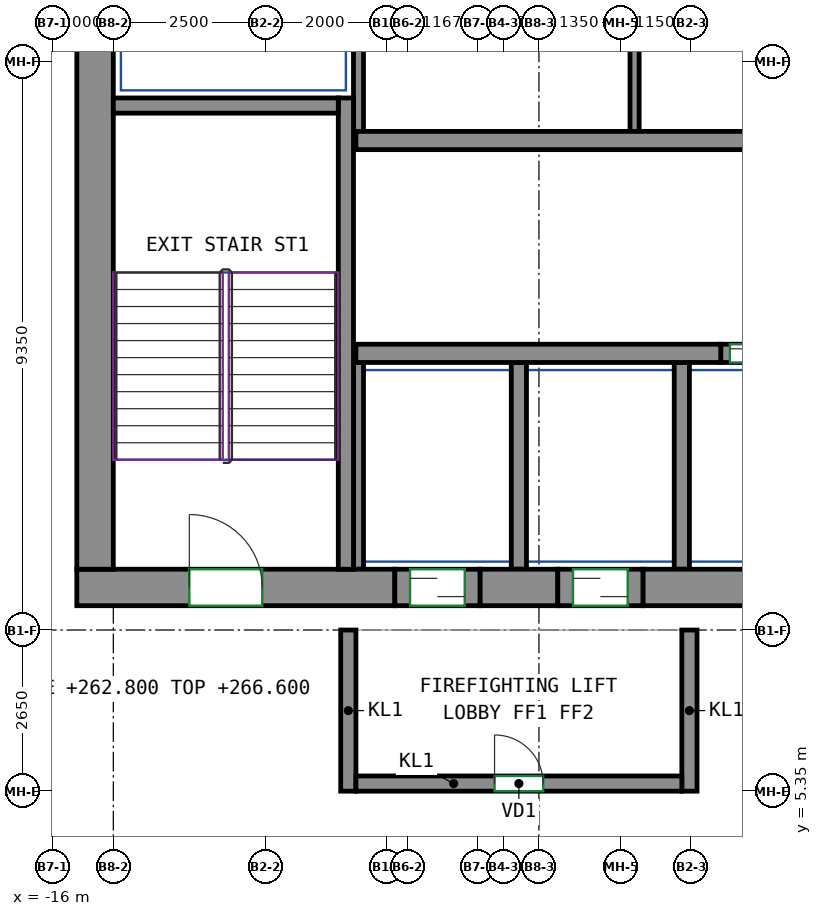
"""IFC4 building model, lengths in metres.
Left out: names, types, materials, properties, quantities, classifications, styles, units other than length and angle.
Written with IfcOpenShell. Run it as: python <this file> out.ifc"""

import sys

from ifc_helpers import new_model, si_unit, direction, frame, frame_2d, origin, place, context, subcontext, project, spatial, rectangle, extrude, source, transform, mapped, element, fill, save


model = new_model("IFC4")
c1 = context("Model", 3, precision=1e-05, world=origin(), true_north=direction((0.0, 1.0)))
c2 = subcontext(c1, "Body", "Model", "MODEL_VIEW")
j1 = project(units=[si_unit("LENGTHUNIT", "METRE"), si_unit("PLANEANGLEUNIT", "RADIAN")], contexts=[c1])
p1 = place(None, origin())
s1 = spatial("IfcSite", under=j1, at=p1, CompositionType="ELEMENT")
p2 = place(p1, origin())
s2 = spatial("IfcBuilding", under=s1, at=p2, CompositionType="ELEMENT")
p3 = place(p2, frame((0.0, 0.0, 262.8)))
s3 = spatial("IfcBuildingStorey", under=s2, at=p3, CompositionType="ELEMENT", Elevation=262.8)
m1 = source(origin(), c2, "Body", "SweptSolid", [
    extrude(rectangle(XDim=5.23, YDim=0.6, at=frame_2d((2.615, 0.0))), origin(), (0.0, 0.0, 1.0), 3.8),
])
p4 = place(p3, frame((-15.6, 8.7, 0.0), z_axis=(0.0, 0.0, 1.0), x_axis=(1.0, 0.0, 0.0)))
e1 = element("IfcWall", 1, at=p4, inside=s3, PredefinedType="SHEAR", context=c2, shape_type="MappedRepresentation", body=[
    mapped(m1, transform((0.0, 0.0, 0.0))),
])
p5 = place(p4, frame((1.85, 0.0, 0.0)))
e2 = element("IfcOpeningElement", 2, at=p5, cuts=e1, PredefinedType="OPENING", context=c2, shape_type="SweptSolid", body=[
    extrude(rectangle(XDim=1.2, YDim=2.1, at=frame_2d((0.6, 1.05))), frame((0.0, 0.31, 0.0), z_axis=(0.0, -1.0, 0.0), x_axis=(1.0, 0.0, 0.0)), (0.0, 0.0, 1.0), 0.62),
])
m2 = source(origin(), c2, "Body", "SweptSolid", [
    extrude(rectangle(XDim=1.28, YDim=0.6, at=frame_2d((0.64, 0.0))), origin(), (0.0, 0.0, 1.0), 3.8),
])
p6 = place(p3, frame((-8.97, 8.7, 0.0), z_axis=(0.0, 0.0, 1.0), x_axis=(1.0, 0.0, 0.0)))
e3 = element("IfcWall", 3, at=p6, inside=s3, PredefinedType="SHEAR", context=c2, shape_type="MappedRepresentation", body=[
    mapped(m2, transform((0.0, 0.0, 0.0))),
])
m3 = source(origin(), c2, "Body", "SweptSolid", [
    extrude(rectangle(XDim=14.18, YDim=0.6, at=frame_2d((7.09, 0.0))), origin(), (0.0, 0.0, 1.0), 3.8),
])
p7 = place(p3, frame((-6.29, 8.7, 0.0), z_axis=(0.0, 0.0, 1.0), x_axis=(1.0, 0.0, 0.0)))
e4 = element("IfcWall", 4, at=p7, inside=s3, PredefinedType="SHEAR", context=c2, shape_type="MappedRepresentation", body=[
    mapped(m3, transform((0.0, 0.0, 0.0))),
])
m4 = source(origin(), c2, "Body", "SweptSolid", [
    extrude(rectangle(XDim=12.0, YDim=0.6, at=frame_2d((6.0, 0.0))), origin(), (0.0, 0.0, 1.0), 3.8),
])
p8 = place(p3, frame((-15.3, 9.0, 0.0), z_axis=(0.0, 0.0, 1.0), x_axis=(0.0, 1.0, 0.0)))
e5 = element("IfcWall", 5, at=p8, inside=s3, PredefinedType="SHEAR", context=c2, shape_type="MappedRepresentation", body=[
    mapped(m4, transform((0.0, 0.0, 0.0))),
])
m5 = source(origin(), c2, "Body", "SweptSolid", [
    extrude(rectangle(XDim=7.75, YDim=0.25, at=frame_2d((3.875, 0.0))), origin(), (0.0, 0.0, 1.0), 3.8),
])
p9 = place(p3, frame((-11.175, 9.0, 0.0), z_axis=(0.0, 0.0, 1.0), x_axis=(0.0, 1.0, 0.0)))
e6 = element("IfcWall", 6, at=p9, inside=s3, PredefinedType="SHEAR", context=c2, shape_type="MappedRepresentation", body=[
    mapped(m5, transform((0.0, 0.0, 0.0))),
])
m6 = source(origin(), c2, "Body", "SweptSolid", [
    extrude(rectangle(XDim=3.7, YDim=0.25, at=frame_2d((1.85, 0.0))), origin(), (0.0, 0.0, 1.0), 3.8),
])
p10 = place(p3, frame((-15.0, 16.625, 0.0), z_axis=(0.0, 0.0, 1.0), x_axis=(1.0, 0.0, 0.0)))
e7 = element("IfcWall", 7, at=p10, inside=s3, PredefinedType="SHEAR", context=c2, shape_type="MappedRepresentation", body=[
    mapped(m6, transform((0.0, 0.0, 0.0))),
])
m7 = source(origin(), c2, "Body", "SweptSolid", [
    extrude(rectangle(XDim=6.0, YDim=0.3, at=frame_2d((3.0, 0.0))), origin(), (0.0, 0.0, 1.0), 3.8),
])
p11 = place(p3, frame((-11.01, 12.55, 0.0), z_axis=(0.0, 0.0, 1.0), x_axis=(1.0, 0.0, 0.0)))
e8 = element("IfcWall", 8, at=p11, inside=s3, PredefinedType="SHEAR", context=c2, shape_type="MappedRepresentation", body=[
    mapped(m7, transform((0.0, 0.0, 0.0))),
])
m8 = source(origin(), c2, "Body", "SweptSolid", [
    extrude(rectangle(XDim=22.08, YDim=0.3, at=frame_2d((11.04, 0.0))), origin(), (0.0, 0.0, 1.0), 3.8),
])
p12 = place(p3, frame((-11.01, 16.05, 0.0), z_axis=(0.0, 0.0, 1.0), x_axis=(1.0, 0.0, 0.0)))
e9 = element("IfcWall", 9, at=p12, inside=s3, PredefinedType="SHEAR", context=c2, shape_type="MappedRepresentation", body=[
    mapped(m8, transform((0.0, 0.0, 0.0))),
])
m9 = source(origin(), c2, "Body", "SweptSolid", [
    extrude(rectangle(XDim=1.4, YDim=0.3, at=frame_2d((0.7, 0.0))), origin(), (0.0, 0.0, 1.0), 3.8),
])
p13 = place(p3, frame((-5.01, 12.55, 0.0), z_axis=(0.0, 0.0, 1.0), x_axis=(1.0, 0.0, 0.0)))
e10 = element("IfcWall", 10, at=p13, inside=s3, PredefinedType="PARTITIONING", context=c2, shape_type="MappedRepresentation", body=[
    mapped(m9, transform((0.0, 0.0, 0.0))),
])
p14 = place(p13, frame((0.15, 0.0, 0.0)))
e11 = element("IfcOpeningElement", 11, at=p14, cuts=e10, PredefinedType="OPENING", context=c2, shape_type="SweptSolid", body=[
    extrude(rectangle(XDim=1.1, YDim=2.1, at=frame_2d((0.55, 1.05))), frame((0.0, 0.16, 0.0), z_axis=(0.0, -1.0, 0.0), x_axis=(1.0, 0.0, 0.0)), (0.0, 0.0, 1.0), 0.32),
])
m10 = source(origin(), c2, "Body", "SweptSolid", [
    extrude(rectangle(XDim=2.65, YDim=0.25, at=frame_2d((1.325, 0.0))), origin(), (0.0, 0.0, 1.0), 3.8),
])
for number, where, z_axis, x_axis in (
    (12, (-11.135, 5.35, 0.0), (0.0, 0.0, 1.0), (0.0, 1.0, 0.0)),
    (13, (-5.525, 5.35, 0.0), (0.0, 0.0, 1.0), (0.0, 1.0, 0.0)),
):
    element("IfcWall", number, at=place(p3, frame(where, z_axis=z_axis, x_axis=x_axis)), inside=s3, PredefinedType="PARTITIONING", context=c2, shape_type="MappedRepresentation", body=[
        mapped(m10, transform((0.0, 0.0, 0.0))),
    ])
m11 = source(origin(), c2, "Body", "SweptSolid", [
    extrude(rectangle(XDim=5.36, YDim=0.25, at=frame_2d((2.68, 0.0))), origin(), (0.0, 0.0, 1.0), 3.8),
])
p15 = place(p3, frame((-11.01, 5.475, 0.0), z_axis=(0.0, 0.0, 1.0), x_axis=(1.0, 0.0, 0.0)))
e14 = element("IfcWall", 14, at=p15, inside=s3, PredefinedType="PARTITIONING", context=c2, shape_type="MappedRepresentation", body=[
    mapped(m11, transform((0.0, 0.0, 0.0))),
])
p16 = place(p15, frame((2.28, 0.0, 0.0)))
e15 = element("IfcOpeningElement", 15, at=p16, cuts=e14, PredefinedType="OPENING", context=c2, shape_type="SweptSolid", body=[
    extrude(rectangle(XDim=0.8, YDim=2.0, at=frame_2d((0.4, 1.0))), frame((0.0, 0.135, 0.0), z_axis=(0.0, -1.0, 0.0), x_axis=(1.0, 0.0, 0.0)), (0.0, 0.0, 1.0), 0.27),
])
m12 = source(origin(), c2, "Body", "SweptSolid", [
    extrude(rectangle(XDim=4.8, YDim=0.165, at=frame_2d((2.4, 0.0))), origin(), (0.0, 0.0, 1.0), 3.8),
])
p17 = place(p3, frame((-10.968, 16.2, 0.0), z_axis=(0.0, 0.0, 1.0), x_axis=(0.0, 1.0, 0.0)))
e16 = element("IfcWall", 16, at=p17, inside=s3, PredefinedType="PARTITIONING", context=c2, shape_type="MappedRepresentation", body=[
    mapped(m12, transform((0.0, 0.0, 0.0))),
])
m13 = source(origin(), c2, "Body", "SweptSolid", [
    extrude(rectangle(XDim=3.4, YDim=0.165, at=frame_2d((1.7, 0.0))), origin(), (0.0, 0.0, 1.0), 3.8),
])
p18 = place(p3, frame((-10.968, 9.0, 0.0), z_axis=(0.0, 0.0, 1.0), x_axis=(0.0, 1.0, 0.0)))
e17 = element("IfcWall", 17, at=p18, inside=s3, PredefinedType="PARTITIONING", context=c2, shape_type="MappedRepresentation", body=[
    mapped(m13, transform((0.0, 0.0, 0.0))),
])
m14 = source(origin(), c2, "Body", "SweptSolid", [
    extrude(rectangle(XDim=3.4, YDim=0.25, at=frame_2d((1.7, 0.0))), origin(), (0.0, 0.0, 1.0), 3.8),
])
for number, where, z_axis, x_axis in (
    (18, (-5.65, 9.0, 0.0), (0.0, 0.0, 1.0), (0.0, 1.0, 0.0)),
    (19, (-8.33, 9.0, 0.0), (0.0, 0.0, 1.0), (0.0, 1.0, 0.0)),
):
    element("IfcWall", number, at=place(p3, frame(where, z_axis=z_axis, x_axis=x_axis)), inside=s3, PredefinedType="PARTITIONING", context=c2, shape_type="MappedRepresentation", body=[
        mapped(m14, transform((0.0, 0.0, 0.0))),
    ])
m15 = source(origin(), c2, "Body", "SweptSolid", [
    extrude(rectangle(XDim=4.8, YDim=0.15, at=frame_2d((2.4, 0.0))), origin(), (0.0, 0.0, 1.0), 3.8),
])
p19 = place(p3, frame((-6.427, 16.2, 0.0), z_axis=(0.0, 0.0, 1.0), x_axis=(0.0, 1.0, 0.0)))
e20 = element("IfcWall", 20, at=p19, inside=s3, PredefinedType="PARTITIONING", context=c2, shape_type="MappedRepresentation", body=[
    mapped(m15, transform((0.0, 0.0, 0.0))),
])
m16 = source(origin(), c2, "Body", "SweptSolid", [
    extrude(rectangle(XDim=1.4, YDim=0.6, at=frame_2d((0.7, 0.0))), origin(), (0.0, 0.0, 1.0), 2.7),
])
p20 = place(p3, frame((-10.37, 8.7, 0.0), z_axis=(0.0, 0.0, 1.0), x_axis=(1.0, 0.0, 0.0)))
e21 = element("IfcWall", 21, at=p20, inside=s3, PredefinedType="PARTITIONING", context=c2, shape_type="MappedRepresentation", body=[
    mapped(m16, transform((0.0, 0.0, 0.0))),
])
p21 = place(p20, frame((0.25, 0.0, 0.0)))
e22 = element("IfcOpeningElement", 22, at=p21, cuts=e21, PredefinedType="OPENING", context=c2, shape_type="SweptSolid", body=[
    extrude(rectangle(XDim=0.9, YDim=2.1, at=frame_2d((0.45, 1.05))), frame((0.0, 0.31, 0.0), z_axis=(0.0, -1.0, 0.0), x_axis=(1.0, 0.0, 0.0)), (0.0, 0.0, 1.0), 0.62),
])
m17 = source(origin(), c2, "Body", "SweptSolid", [
    extrude(rectangle(XDim=1.4, YDim=0.6, at=frame_2d((0.7, 0.0))), origin(), (0.0, 0.0, 1.0), 2.7),
])
p22 = place(p3, frame((-7.69, 8.7, 0.0), z_axis=(0.0, 0.0, 1.0), x_axis=(1.0, 0.0, 0.0)))
e23 = element("IfcWall", 23, at=p22, inside=s3, PredefinedType="PARTITIONING", context=c2, shape_type="MappedRepresentation", body=[
    mapped(m17, transform((0.0, 0.0, 0.0))),
])
p23 = place(p22, frame((0.25, 0.0, 0.0)))
e24 = element("IfcOpeningElement", 24, at=p23, cuts=e23, PredefinedType="OPENING", context=c2, shape_type="SweptSolid", body=[
    extrude(rectangle(XDim=0.9, YDim=2.1, at=frame_2d((0.45, 1.05))), frame((0.0, 0.31, 0.0), z_axis=(0.0, -1.0, 0.0), x_axis=(1.0, 0.0, 0.0)), (0.0, 0.0, 1.0), 0.62),
])
p24 = place(p16, origin())
e25 = element("IfcDoor", 25, at=p24, inside=s3, OperationType="SINGLE_SWING_LEFT", PredefinedType="DOOR", context=c2, shape_type="SweptSolid", body=[
    extrude(rectangle(XDim=0.8, YDim=2.0, at=frame_2d((0.4, 1.0))), frame((0.0, 0.025, 0.0), z_axis=(0.0, -1.0, 0.0), x_axis=(1.0, 0.0, 0.0)), (0.0, 0.0, 1.0), 0.05),
])
fill(e15, e25)
p25 = place(p21, origin())
e26 = element("IfcDoor", 26, at=p25, inside=s3, OperationType="SLIDING_TO_LEFT", PredefinedType="DOOR", context=c2, shape_type="SweptSolid", body=[
    extrude(rectangle(XDim=0.9, YDim=2.1, at=frame_2d((0.45, 1.05))), frame((0.0, 0.205, 0.0), z_axis=(0.0, -1.0, 0.0), x_axis=(1.0, 0.0, 0.0)), (0.0, 0.0, 1.0), 0.05),
])
fill(e22, e26)
p26 = place(p23, origin())
e27 = element("IfcDoor", 27, at=p26, inside=s3, OperationType="SLIDING_TO_RIGHT", PredefinedType="DOOR", context=c2, shape_type="SweptSolid", body=[
    extrude(rectangle(XDim=0.9, YDim=2.1, at=frame_2d((0.45, 1.05))), frame((0.0, 0.205, 0.0), z_axis=(0.0, -1.0, 0.0), x_axis=(1.0, 0.0, 0.0)), (0.0, 0.0, 1.0), 0.05),
])
fill(e24, e27)
p27 = place(p14, origin())
e28 = element("IfcDoor", 28, at=p27, inside=s3, OperationType="DOUBLE_DOOR_SLIDING", PredefinedType="DOOR", context=c2, shape_type="SweptSolid", body=[
    extrude(rectangle(XDim=1.1, YDim=2.1, at=frame_2d((0.55, 1.05))), frame((0.0, 0.025, 0.0), z_axis=(0.0, -1.0, 0.0), x_axis=(1.0, 0.0, 0.0)), (0.0, 0.0, 1.0), 0.05),
])
fill(e11, e28)
p28 = place(p5, origin())
e29 = element("IfcDoor", 29, at=p28, inside=s3, OperationType="DOUBLE_DOOR_SINGLE_SWING", PredefinedType="DOOR", context=c2, shape_type="SweptSolid", body=[
    extrude(rectangle(XDim=1.2, YDim=2.1, at=frame_2d((0.6, 1.05))), frame((0.0, 0.205, 0.0), z_axis=(0.0, -1.0, 0.0), x_axis=(1.0, 0.0, 0.0)), (0.0, 0.0, 1.0), 0.05),
])
fill(e2, e29)
save(model, sys.argv[1])
